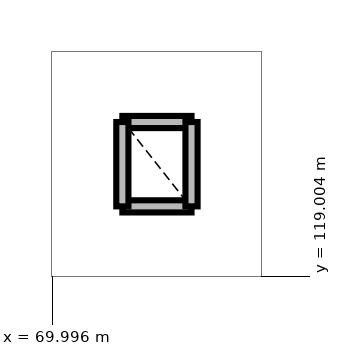
"""IFC4 building model, lengths in metres.
Left out: names, types, materials, properties, quantities, classifications, styles, units other than length and angle.
Written with IfcOpenShell. Run it as: python <this file> out.ifc"""

import sys

from ifc_helpers import new_model, si_unit, direction, frame, frame_2d, origin, place, context, subcontext, project, spatial, rectangle, extrude, element, save


model = new_model("IFC4")
c1 = context("Model", 3, precision=1e-05, world=origin(), true_north=direction((0.0, 1.0)))
c2 = subcontext(c1, "Body", "Model", "MODEL_VIEW")
j1 = project(units=[si_unit("LENGTHUNIT", "METRE"), si_unit("PLANEANGLEUNIT", "RADIAN")], contexts=[c1])
p1 = place(None, origin())
s1 = spatial("IfcSite", under=j1, at=p1, CompositionType="ELEMENT")
p2 = place(p1, origin())
s2 = spatial("IfcBuilding", under=s1, at=p2, CompositionType="ELEMENT")
p3 = place(p2, frame((0.0, 0.0, 13.5)))
s3 = spatial("IfcBuildingStorey", under=s2, at=p3, CompositionType="ELEMENT", Elevation=13.5)
for number, where, z_axis, x_axis in (
    (1, (70.92, 119.92, 0.0), (0.0, 0.0, 1.0), (1.0, 0.0, 0.0)),
    (2, (71.83, 121.03, 0.0), (0.0, 0.0, 1.0), (-1.0, 0.0, 0.0)),
):
    element("IfcWall", number, at=place(p3, frame(where, z_axis=z_axis, x_axis=x_axis)), inside=s3, PredefinedType="PARTITIONING", context=c2, shape_type="SweptSolid", body=[
        extrude(rectangle(XDim=0.91, YDim=0.16, at=frame_2d((0.455, 0.0))), origin(), (0.0, 0.0, 1.0), 3.65),
    ])
for number, where, z_axis, x_axis in (
    (3, (70.92, 121.03, 0.0), (0.0, 0.0, 1.0), (0.0, -1.0, 0.0)),
    (4, (71.83, 119.92, 0.0), (0.0, 0.0, 1.0), (0.0, 1.0, 0.0)),
):
    element("IfcWall", number, at=place(p3, frame(where, z_axis=z_axis, x_axis=x_axis)), inside=s3, PredefinedType="PARTITIONING", context=c2, shape_type="SweptSolid", body=[
        extrude(rectangle(XDim=1.11, YDim=0.16, at=frame_2d((0.555, 0.0))), origin(), (0.0, 0.0, 1.0), 3.65),
    ])
save(model, sys.argv[1])
